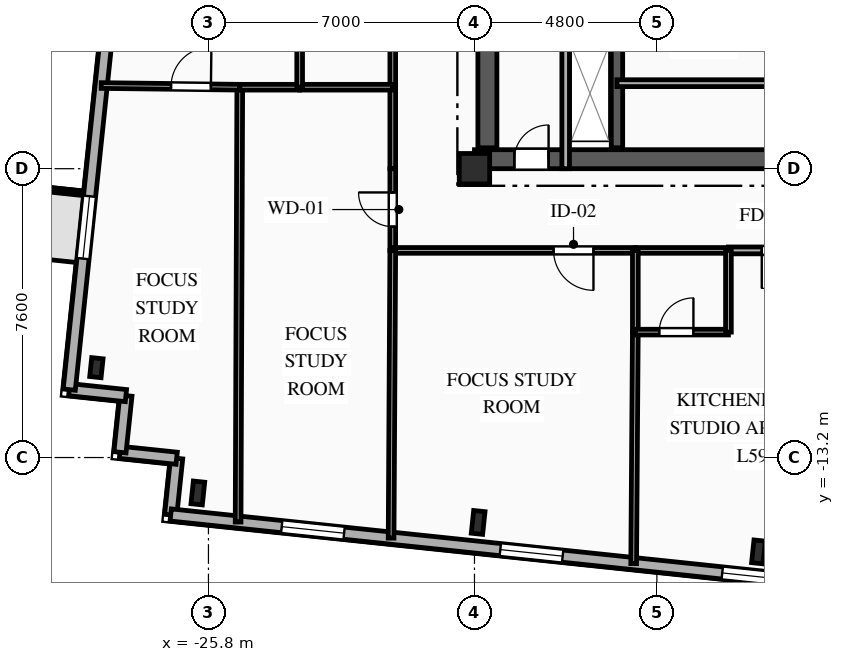
"""IFC4 building model, lengths in metres.
Left out: names, types, materials, properties, quantities, classifications, styles, units other than length and angle.
Written with IfcOpenShell. Run it as: python <this file> out.ifc"""

import sys

from ifc_helpers import new_model, si_unit, direction, frame, frame_2d, origin, origin_2d, place, context, subcontext, project, spatial, rectangle, i_section, extrude, element, fill, save


model = new_model("IFC4")
c1 = context("Model", 3, precision=1e-05, world=origin(), true_north=direction((0.0, 1.0)))
c2 = subcontext(c1, "Body", "Model", "MODEL_VIEW")
j1 = project(units=[si_unit("LENGTHUNIT", "METRE"), si_unit("PLANEANGLEUNIT", "RADIAN")], contexts=[c1])
p1 = place(None, origin())
s1 = spatial("IfcSite", under=j1, at=p1, CompositionType="ELEMENT")
p2 = place(p1, origin())
s2 = spatial("IfcBuilding", under=s1, at=p2, CompositionType="ELEMENT")
p3 = place(p2, frame((0.0, 0.0, 209.8)))
s3 = spatial("IfcBuildingStorey", under=s2, at=p3, CompositionType="ELEMENT", Elevation=209.8)
p4 = place(p3, frame((-18.8, -5.6, 0.0), z_axis=(0.0, 0.0, 1.0), x_axis=(1.0, 0.0, 0.0)))
e1 = element("IfcColumn", 1, at=p4, inside=s3, PredefinedType="COLUMN", context=c2, shape_type="SweptSolid", body=[
    extrude(rectangle(XDim=0.8, YDim=0.8, at=origin_2d()), origin(), (0.0, 0.0, 1.0), 3.35),
])
for number, where, z_axis, x_axis in (
    (2, (-26.079, -14.133, 0.0), (0.0, 0.0, 1.0), (0.995, -0.105, 0.0)),
    (3, (-18.703, -14.908, 0.0), (0.0, 0.0, 1.0), (0.995, -0.105, 0.0)),
    (4, (-11.327, -15.683, 0.0), (0.0, 0.0, 1.0), (0.995, -0.105, 0.0)),
):
    element("IfcColumn", number, at=place(p3, frame(where, z_axis=z_axis, x_axis=x_axis)), inside=s3, PredefinedType="COLUMN", context=c2, shape_type="SweptSolid", body=[
        extrude(i_section(OverallWidth=0.3, OverallDepth=0.6, WebThickness=0.015, FlangeThickness=0.03, FilletRadius=0.027, at=origin_2d()), origin(), (0.0, 0.0, 1.0), 3.35),
    ])
p5 = place(p3, frame((-28.749, -10.835, 0.0), z_axis=(0.0, 0.0, 1.0), x_axis=(0.994521895368, -0.104528463268, 0.0)))
e5 = element("IfcColumn", 5, at=p5, inside=s3, PredefinedType="COLUMN", context=c2, shape_type="SweptSolid", body=[
    extrude(i_section(OverallWidth=0.3, OverallDepth=0.5, WebThickness=0.014, FlangeThickness=0.028, FilletRadius=0.027, at=origin_2d()), origin(), (0.0, 0.0, 1.0), 3.35),
])
for number, where, z_axis, x_axis in (
    (6, (-26.793, -14.711, 0.0), (0.0, 0.0, 1.0), (0.104, 0.995, 0.0)),
    (7, (-26.637, -13.219, 0.0), (0.0, 0.0, 1.0), (-0.995, 0.104, 0.0)),
):
    element("IfcWall", number, at=place(p3, frame(where, z_axis=z_axis, x_axis=x_axis)), inside=s3, PredefinedType="SOLIDWALL", context=c2, shape_type="SweptSolid", body=[
        extrude(rectangle(XDim=1.5, YDim=0.32, at=frame_2d((0.75, 0.0))), origin(), (0.0, 0.0, 1.0), 3.04),
    ])
p6 = place(p3, frame((-28.128, -13.062, 0.0), z_axis=(0.0, 0.0, 1.0), x_axis=(0.104481464157, 0.994526834051, 0.0)))
e8 = element("IfcWall", 8, at=p6, inside=s3, PredefinedType="SOLIDWALL", context=c2, shape_type="SweptSolid", body=[
    extrude(rectangle(XDim=1.5, YDim=0.32, at=frame_2d((0.75, 0.0))), origin(), (0.0, 0.0, 1.0), 3.04),
])
p7 = place(p3, frame((-27.972, -11.571, 0.0), z_axis=(0.0, 0.0, 1.0), x_axis=(-0.994525057048, 0.104498377516, 0.0)))
e9 = element("IfcWall", 9, at=p7, inside=s3, PredefinedType="SOLIDWALL", context=c2, shape_type="SweptSolid", body=[
    extrude(rectangle(XDim=1.5, YDim=0.32, at=frame_2d((0.75, 0.0))), origin(), (0.0, 0.0, 1.0), 3.04),
])
p8 = place(p3, frame((-29.463, -11.414, 0.0), z_axis=(0.0, 0.0, 1.0), x_axis=(0.104530779244, 0.994521651947, 0.0)))
e10 = element("IfcWall", 10, at=p8, inside=s3, PredefinedType="SOLIDWALL", context=c2, shape_type="SweptSolid", body=[
    extrude(rectangle(XDim=28.8, YDim=0.32, at=frame_2d((14.4, 0.0))), origin(), (0.0, 0.0, 1.0), 3.04),
])
p9 = place(p8, frame((3.467, 0.0, 0.85)))
e11 = element("IfcOpeningElement", 11, at=p9, cuts=e10, PredefinedType="OPENING", context=c2, shape_type="SweptSolid", body=[
    extrude(rectangle(XDim=1.65, YDim=1.85, at=frame_2d((0.825, 0.925))), frame((0.0, 0.17, 0.0), z_axis=(0.0, -1.0, 0.0), x_axis=(1.0, 0.0, 0.0)), (0.0, 0.0, 1.0), 0.34),
])
p10 = place(p8, frame((12.738, 0.0, 0.85)))
e12 = element("IfcOpeningElement", 12, at=p10, cuts=e10, PredefinedType="OPENING", context=c2, shape_type="SweptSolid", body=[
    extrude(rectangle(XDim=2.2, YDim=1.85, at=frame_2d((1.1, 0.925))), frame((0.0, 0.17, 0.0), z_axis=(0.0, -1.0, 0.0), x_axis=(1.0, 0.0, 0.0)), (0.0, 0.0, 1.0), 0.34),
])
p11 = place(p8, frame((23.162, 0.0, 0.85)))
e13 = element("IfcOpeningElement", 13, at=p11, cuts=e10, PredefinedType="OPENING", context=c2, shape_type="SweptSolid", body=[
    extrude(rectangle(XDim=1.65, YDim=1.85, at=frame_2d((0.825, 0.925))), frame((0.0, 0.17, 0.0), z_axis=(0.0, -1.0, 0.0), x_axis=(1.0, 0.0, 0.0)), (0.0, 0.0, 1.0), 0.34),
])
p12 = place(p3, frame((18.756, -19.498, 0.0), z_axis=(0.0, 0.0, 1.0), x_axis=(-0.994522060044, 0.104526896475, 0.0)))
e14 = element("IfcWall", 14, at=p12, inside=s3, PredefinedType="SOLIDWALL", context=c2, shape_type="SweptSolid", body=[
    extrude(rectangle(XDim=45.8, YDim=0.32, at=frame_2d((22.9, 0.0))), origin(), (0.0, 0.0, 1.0), 3.04),
])
p13 = place(p12, frame((2.778, 0.0, 0.85)))
e15 = element("IfcOpeningElement", 15, at=p13, cuts=e14, PredefinedType="OPENING", context=c2, shape_type="SweptSolid", body=[
    extrude(rectangle(XDim=1.65, YDim=1.85, at=frame_2d((0.825, 0.925))), frame((0.0, 0.17, 0.0), z_axis=(0.0, -1.0, 0.0), x_axis=(1.0, 0.0, 0.0)), (0.0, 0.0, 1.0), 0.34),
])
p14 = place(p12, frame((7.948, 0.0, 0.85)))
e16 = element("IfcOpeningElement", 16, at=p14, cuts=e14, PredefinedType="OPENING", context=c2, shape_type="SweptSolid", body=[
    extrude(rectangle(XDim=2.2, YDim=1.85, at=frame_2d((1.1, 0.925))), frame((0.0, 0.17, 0.0), z_axis=(0.0, -1.0, 0.0), x_axis=(1.0, 0.0, 0.0)), (0.0, 0.0, 1.0), 0.34),
])
p15 = place(p12, frame((14.954, 0.0, 0.85)))
e17 = element("IfcOpeningElement", 17, at=p15, cuts=e14, PredefinedType="OPENING", context=c2, shape_type="SweptSolid", body=[
    extrude(rectangle(XDim=2.2, YDim=1.85, at=frame_2d((1.1, 0.925))), frame((0.0, 0.17, 0.0), z_axis=(0.0, -1.0, 0.0), x_axis=(1.0, 0.0, 0.0)), (0.0, 0.0, 1.0), 0.34),
])
p16 = place(p12, frame((21.96, 0.0, 0.85)))
e18 = element("IfcOpeningElement", 18, at=p16, cuts=e14, PredefinedType="OPENING", context=c2, shape_type="SweptSolid", body=[
    extrude(rectangle(XDim=2.2, YDim=1.85, at=frame_2d((1.1, 0.925))), frame((0.0, 0.17, 0.0), z_axis=(0.0, -1.0, 0.0), x_axis=(1.0, 0.0, 0.0)), (0.0, 0.0, 1.0), 0.34),
])
p17 = place(p12, frame((29.006, 0.0, 0.85)))
e19 = element("IfcOpeningElement", 19, at=p17, cuts=e14, PredefinedType="OPENING", context=c2, shape_type="SweptSolid", body=[
    extrude(rectangle(XDim=2.2, YDim=1.85, at=frame_2d((1.1, 0.925))), frame((0.0, 0.17, 0.0), z_axis=(0.0, -1.0, 0.0), x_axis=(1.0, 0.0, 0.0)), (0.0, 0.0, 1.0), 0.34),
])
p18 = place(p12, frame((35.429, 0.0, 0.85)))
e20 = element("IfcOpeningElement", 20, at=p18, cuts=e14, PredefinedType="OPENING", context=c2, shape_type="SweptSolid", body=[
    extrude(rectangle(XDim=1.65, YDim=1.85, at=frame_2d((0.825, 0.925))), frame((0.0, 0.17, 0.0), z_axis=(0.0, -1.0, 0.0), x_axis=(1.0, 0.0, 0.0)), (0.0, 0.0, 1.0), 0.34),
])
p19 = place(p12, frame((41.212, 0.0, 0.85)))
e21 = element("IfcOpeningElement", 21, at=p19, cuts=e14, PredefinedType="OPENING", context=c2, shape_type="SweptSolid", body=[
    extrude(rectangle(XDim=1.65, YDim=1.85, at=frame_2d((0.825, 0.925))), frame((0.0, 0.17, 0.0), z_axis=(0.0, -1.0, 0.0), x_axis=(1.0, 0.0, 0.0)), (0.0, 0.0, 1.0), 0.34),
])
p20 = place(p3, frame((-18.8, -5.35, 0.0), z_axis=(0.0, 0.0, 1.0), x_axis=(1.0, 0.0, 0.0)))
e22 = element("IfcWall", 22, at=p20, inside=s3, PredefinedType="SHEAR", context=c2, shape_type="SweptSolid", body=[
    extrude(rectangle(XDim=9.6, YDim=0.5, at=frame_2d((4.8, 0.0))), origin(), (0.0, 0.0, 1.0), 3.04),
])
p21 = place(p20, frame((1.05, 0.0, 0.0)))
e23 = element("IfcOpeningElement", 23, at=p21, cuts=e22, PredefinedType="OPENING", context=c2, shape_type="SweptSolid", body=[
    extrude(rectangle(XDim=0.9, YDim=2.1, at=frame_2d((0.45, 1.05))), frame((0.0, 0.26, 0.0), z_axis=(0.0, -1.0, 0.0), x_axis=(1.0, 0.0, 0.0)), (0.0, 0.0, 1.0), 0.52),
])
p22 = place(p3, frame((-18.46, -5.05, 0.0), z_axis=(0.0, 0.0, 1.0), x_axis=(0.0, 1.0, 0.0)))
e24 = element("IfcWall", 24, at=p22, inside=s3, PredefinedType="SHEAR", context=c2, shape_type="SweptSolid", body=[
    extrude(rectangle(XDim=10.1, YDim=0.5, at=frame_2d((5.05, 0.0))), origin(), (0.0, 0.0, 1.0), 3.04),
])
p23 = place(p3, frame((-15.05, -5.05, 0.0), z_axis=(0.0, 0.0, 1.0), x_axis=(0.0, 1.0, 0.0)))
e25 = element("IfcWall", 25, at=p23, inside=s3, PredefinedType="SHEAR", context=c2, shape_type="SweptSolid", body=[
    extrude(rectangle(XDim=10.1, YDim=0.3, at=frame_2d((5.05, 0.0))), origin(), (0.0, 0.0, 1.0), 3.04),
])
p24 = place(p3, frame((-16.4, -5.6, 0.0), z_axis=(0.0, 0.0, 1.0), x_axis=(0.0, 1.0, 0.0)))
e26 = element("IfcWall", 26, at=p24, inside=s3, PredefinedType="PARTITIONING", context=c2, shape_type="SweptSolid", body=[
    extrude(rectangle(XDim=3.49, YDim=0.2, at=frame_2d((1.745, 0.0))), origin(), (0.0, 0.0, 1.0), 3.04),
])
p25 = place(p3, frame((-15.05, -3.35, 0.0), z_axis=(0.0, 0.0, 1.0), x_axis=(1.0, 0.0, 0.0)))
e27 = element("IfcWall", 27, at=p25, inside=s3, PredefinedType="PARTITIONING", context=c2, shape_type="SweptSolid", body=[
    extrude(rectangle(XDim=5.85, YDim=0.18, at=frame_2d((2.925, 0.0))), origin(), (0.0, 0.0, 1.0), 2.755),
])
p26 = place(p3, frame((-20.95, -7.75, 0.0), z_axis=(0.0, 0.0, 1.0), x_axis=(0.0, 1.0, 0.0)))
e28 = element("IfcWall", 28, at=p26, inside=s3, PredefinedType="PARTITIONING", context=c2, shape_type="SweptSolid", body=[
    extrude(rectangle(XDim=2.15, YDim=0.15, at=frame_2d((1.075, 0.0))), origin(), (0.0, 0.0, 1.0), 3.04),
])
p27 = place(p26, frame((0.625, 0.0, 0.0)))
e29 = element("IfcOpeningElement", 29, at=p27, cuts=e28, PredefinedType="OPENING", context=c2, shape_type="SweptSolid", body=[
    extrude(rectangle(XDim=0.9, YDim=2.1, at=frame_2d((0.45, 1.05))), frame((0.0, 0.085, 0.0), z_axis=(0.0, -1.0, 0.0), x_axis=(1.0, 0.0, 0.0)), (0.0, 0.0, 1.0), 0.17),
])
p28 = place(p3, frame((-14.567, -7.75, 0.0), z_axis=(0.0, 0.0, 1.0), x_axis=(-1.0, 0.0, 0.0)))
e30 = element("IfcWall", 30, at=p28, inside=s3, PredefinedType="PARTITIONING", context=c2, shape_type="SweptSolid", body=[
    extrude(rectangle(XDim=6.383, YDim=0.15, at=frame_2d((3.191, 0.0))), origin(), (0.0, 0.0, 1.0), 3.04),
])
p29 = place(p28, frame((1.102, 0.0, 0.0)))
e31 = element("IfcOpeningElement", 31, at=p29, cuts=e30, PredefinedType="OPENING", context=c2, shape_type="SweptSolid", body=[
    extrude(rectangle(XDim=1.05, YDim=2.15, at=frame_2d((0.525, 1.075))), frame((0.0, 0.085, 0.0), z_axis=(0.0, -1.0, 0.0), x_axis=(1.0, 0.0, 0.0)), (0.0, 0.0, 1.0), 0.17),
])
p30 = place(p3, frame((-7.583, -7.75, 0.0), z_axis=(0.0, 0.0, 1.0), x_axis=(-1.0, 0.0, 0.0)))
e32 = element("IfcWall", 32, at=p30, inside=s3, PredefinedType="PARTITIONING", context=c2, shape_type="SweptSolid", body=[
    extrude(rectangle(XDim=4.534, YDim=0.18, at=frame_2d((2.267, 0.0))), origin(), (0.0, 0.0, 1.0), 3.04),
])
p31 = place(p30, frame((2.657, 0.0, 0.0)))
e33 = element("IfcOpeningElement", 33, at=p31, cuts=e32, PredefinedType="OPENING", context=c2, shape_type="SweptSolid", body=[
    extrude(rectangle(XDim=1.0, YDim=2.15, at=frame_2d((0.5, 1.075))), frame((0.0, 0.1, 0.0), z_axis=(0.0, -1.0, 0.0), x_axis=(1.0, 0.0, 0.0)), (0.0, 0.0, 1.0), 0.2),
])
p32 = place(p3, frame((-12.117, -7.75, 0.0), z_axis=(0.0, 0.0, 1.0), x_axis=(-1.0, 0.0, 0.0)))
e34 = element("IfcWall", 34, at=p32, inside=s3, PredefinedType="PLUMBINGWALL", context=c2, shape_type="SweptSolid", body=[
    extrude(rectangle(XDim=2.45, YDim=0.15, at=frame_2d((1.225, 0.0))), origin(), (0.0, 0.0, 1.0), 3.04),
])
p33 = place(p3, frame((-20.95, -5.6, 0.0), z_axis=(0.0, 0.0, 1.0), x_axis=(0.0, 1.0, 0.0)))
e35 = element("IfcWall", 35, at=p33, inside=s3, PredefinedType="PARTITIONING", context=c2, shape_type="SweptSolid", body=[
    extrude(rectangle(XDim=2.144, YDim=0.15, at=frame_2d((1.072, 0.0))), origin(), (0.0, 0.0, 1.0), 3.04),
])
p34 = place(p3, frame((-20.95, -3.456, 0.0), z_axis=(0.0, 0.0, 1.0), x_axis=(0.0, 1.0, 0.0)))
e36 = element("IfcWall", 36, at=p34, inside=s3, PredefinedType="PLUMBINGWALL", context=c2, shape_type="SweptSolid", body=[
    extrude(rectangle(XDim=2.15, YDim=0.15, at=frame_2d((1.075, 0.0))), origin(), (0.0, 0.0, 1.0), 3.04),
])
p35 = place(p3, frame((-24.976, -3.456, 0.0), z_axis=(0.0, 0.0, 1.0), x_axis=(-0.003840873, -0.99999262382, 0.0)))
e37 = element("IfcWall", 37, at=p35, inside=s3, PredefinedType="PARTITIONING", context=c2, shape_type="SweptSolid", body=[
    extrude(rectangle(XDim=11.441, YDim=0.15, at=frame_2d((5.721, 0.0))), origin(), (0.0, 0.0, 1.0), 3.04),
])
p36 = place(p3, frame((-28.622, -3.412, 0.0), z_axis=(0.0, 0.0, 1.0), x_axis=(0.999927389555, -0.01205054433, 0.0)))
e38 = element("IfcWall", 38, at=p36, inside=s3, PredefinedType="PARTITIONING", context=c2, shape_type="SweptSolid", body=[
    extrude(rectangle(XDim=3.647, YDim=0.15, at=frame_2d((1.823, 0.0))), origin(), (0.0, 0.0, 1.0), 3.04),
])
p37 = place(p36, frame((1.837, 0.0, 0.0)))
e39 = element("IfcOpeningElement", 39, at=p37, cuts=e38, PredefinedType="OPENING", context=c2, shape_type="SweptSolid", body=[
    extrude(rectangle(XDim=1.05, YDim=2.15, at=frame_2d((0.525, 1.075))), frame((0.0, 0.085, 0.0), z_axis=(0.0, -1.0, 0.0), x_axis=(1.0, 0.0, 0.0)), (0.0, 0.0, 1.0), 0.17),
])
p38 = place(p3, frame((-24.976, -3.456, 0.0), z_axis=(0.0, 0.0, 1.0), x_axis=(1.0, 0.0, 0.0)))
e40 = element("IfcWall", 40, at=p38, inside=s3, PredefinedType="PARTITIONING", context=c2, shape_type="SweptSolid", body=[
    extrude(rectangle(XDim=1.576, YDim=0.15, at=frame_2d((0.788, 0.0))), origin(), (0.0, 0.0, 1.0), 3.04),
])
p39 = place(p3, frame((-23.4, -3.456, 0.0), z_axis=(0.0, 0.0, 1.0), x_axis=(1.0, 0.0, 0.0)))
e41 = element("IfcWall", 41, at=p39, inside=s3, PredefinedType="PLUMBINGWALL", context=c2, shape_type="SweptSolid", body=[
    extrude(rectangle(XDim=2.45, YDim=0.15, at=frame_2d((1.225, 0.0))), origin(), (0.0, 0.0, 1.0), 3.04),
])
p40 = place(p3, frame((-20.95, -7.75, 0.0), z_axis=(0.0, 0.0, 1.0), x_axis=(-0.005804668564, -0.99998315277, 0.0)))
e42 = element("IfcWall", 42, at=p40, inside=s3, PredefinedType="PARTITIONING", context=c2, shape_type="SweptSolid", body=[
    extrude(rectangle(XDim=7.571, YDim=0.15, at=frame_2d((3.785, 0.0))), origin(), (0.0, 0.0, 1.0), 3.04),
])
p41 = place(p3, frame((-23.4, -1.306, 0.0), z_axis=(0.0, 0.0, 1.0), x_axis=(0.0, -1.0, 0.0)))
e43 = element("IfcWall", 43, at=p41, inside=s3, PredefinedType="PLUMBINGWALL", context=c2, shape_type="SweptSolid", body=[
    extrude(rectangle(XDim=2.15, YDim=0.15, at=frame_2d((1.075, 0.0))), origin(), (0.0, 0.0, 1.0), 2.695),
])
p42 = place(p3, frame((-14.567, -9.9, 0.0), z_axis=(0.0, 0.0, 1.0), x_axis=(-0.007213951996, -0.99997397911, 0.0)))
e44 = element("IfcWall", 44, at=p42, inside=s3, PredefinedType="PARTITIONING", context=c2, shape_type="SweptSolid", body=[
    extrude(rectangle(XDim=6.092, YDim=0.15, at=frame_2d((3.046, 0.0))), origin(), (0.0, 0.0, 1.0), 3.04),
])
p43 = place(p3, frame((-14.567, -7.75, 0.0), z_axis=(0.0, 0.0, 1.0), x_axis=(0.0, -1.0, 0.0)))
e45 = element("IfcWall", 45, at=p43, inside=s3, PredefinedType="PLUMBINGWALL", context=c2, shape_type="SweptSolid", body=[
    extrude(rectangle(XDim=2.15, YDim=0.15, at=frame_2d((1.075, 0.0))), origin(), (0.0, 0.0, 1.0), 3.04),
])
p44 = place(p3, frame((-14.567, -9.9, 0.0), z_axis=(0.0, 0.0, 1.0), x_axis=(1.0, 0.0, 0.0)))
e46 = element("IfcWall", 46, at=p44, inside=s3, PredefinedType="PLUMBINGWALL", context=c2, shape_type="SweptSolid", body=[
    extrude(rectangle(XDim=2.45, YDim=0.15, at=frame_2d((1.225, 0.0))), origin(), (0.0, 0.0, 1.0), 3.04),
])
p45 = place(p44, frame((0.629, 0.0, 0.0)))
e47 = element("IfcOpeningElement", 47, at=p45, cuts=e46, PredefinedType="OPENING", context=c2, shape_type="SweptSolid", body=[
    extrude(rectangle(XDim=0.9, YDim=2.1, at=frame_2d((0.45, 1.05))), frame((0.0, 0.085, 0.0), z_axis=(0.0, -1.0, 0.0), x_axis=(1.0, 0.0, 0.0)), (0.0, 0.0, 1.0), 0.17),
])
p46 = place(p3, frame((-12.117, -9.9, 0.0), z_axis=(0.0, 0.0, 1.0), x_axis=(0.0, 1.0, 0.0)))
e48 = element("IfcWall", 48, at=p46, inside=s3, PredefinedType="PLUMBINGWALL", context=c2, shape_type="SweptSolid", body=[
    extrude(rectangle(XDim=2.15, YDim=0.15, at=frame_2d((1.075, 0.0))), origin(), (0.0, 0.0, 1.0), 3.04),
])
p47 = place(p9, origin())
e49 = element("IfcWindow", 49, at=p47, inside=s3, PartitioningType="SINGLE_PANEL", PredefinedType="WINDOW", context=c2, shape_type="SweptSolid", body=[
    extrude(rectangle(XDim=1.65, YDim=1.85, at=frame_2d((0.825, 0.925))), frame((0.0, 0.03, 0.0), z_axis=(0.0, -1.0, 0.0), x_axis=(1.0, 0.0, 0.0)), (0.0, 0.0, 1.0), 0.06),
])
fill(e11, e49)
p48 = place(p17, origin())
e50 = element("IfcWindow", 50, at=p48, inside=s3, PartitioningType="SINGLE_PANEL", PredefinedType="WINDOW", context=c2, shape_type="SweptSolid", body=[
    extrude(rectangle(XDim=2.2, YDim=1.85, at=frame_2d((1.1, 0.925))), frame((0.0, 0.03, 0.0), z_axis=(0.0, -1.0, 0.0), x_axis=(1.0, 0.0, 0.0)), (0.0, 0.0, 1.0), 0.06),
])
fill(e19, e50)
p49 = place(p18, origin())
e51 = element("IfcWindow", 51, at=p49, inside=s3, PartitioningType="SINGLE_PANEL", PredefinedType="WINDOW", context=c2, shape_type="SweptSolid", body=[
    extrude(rectangle(XDim=1.65, YDim=1.85, at=frame_2d((0.825, 0.925))), frame((0.0, 0.03, 0.0), z_axis=(0.0, -1.0, 0.0), x_axis=(1.0, 0.0, 0.0)), (0.0, 0.0, 1.0), 0.06),
])
fill(e20, e51)
p50 = place(p19, origin())
e52 = element("IfcWindow", 52, at=p50, inside=s3, PartitioningType="SINGLE_PANEL", PredefinedType="WINDOW", context=c2, shape_type="SweptSolid", body=[
    extrude(rectangle(XDim=1.65, YDim=1.85, at=frame_2d((0.825, 0.925))), frame((0.0, 0.03, 0.0), z_axis=(0.0, -1.0, 0.0), x_axis=(1.0, 0.0, 0.0)), (0.0, 0.0, 1.0), 0.06),
])
fill(e21, e52)
p51 = place(p21, origin())
e53 = element("IfcDoor", 53, at=p51, inside=s3, OperationType="SINGLE_SWING_RIGHT", PredefinedType="DOOR", context=c2, shape_type="SweptSolid", body=[
    extrude(rectangle(XDim=0.9, YDim=2.1, at=frame_2d((0.45, 1.05))), frame((0.0, 0.025, 0.0), z_axis=(0.0, -1.0, 0.0), x_axis=(1.0, 0.0, 0.0)), (0.0, 0.0, 1.0), 0.05),
])
fill(e23, e53)
p52 = place(p27, origin())
e54 = element("IfcDoor", 54, at=p52, inside=s3, OperationType="SINGLE_SWING_RIGHT", PredefinedType="DOOR", context=c2, shape_type="SweptSolid", body=[
    extrude(rectangle(XDim=0.9, YDim=2.1, at=frame_2d((0.45, 1.05))), frame((0.0, 0.025, 0.0), z_axis=(0.0, -1.0, 0.0), x_axis=(1.0, 0.0, 0.0)), (0.0, 0.0, 1.0), 0.05),
])
fill(e29, e54)
p53 = place(p29, origin())
e55 = element("IfcDoor", 55, at=p53, inside=s3, OperationType="SINGLE_SWING_LEFT", PredefinedType="DOOR", context=c2, shape_type="SweptSolid", body=[
    extrude(rectangle(XDim=1.05, YDim=2.15, at=frame_2d((0.525, 1.075))), frame((0.0, 0.025, 0.0), z_axis=(0.0, -1.0, 0.0), x_axis=(1.0, 0.0, 0.0)), (0.0, 0.0, 1.0), 0.05),
])
fill(e31, e55)
p54 = place(p31, origin())
e56 = element("IfcDoor", 56, at=p54, inside=s3, OperationType="SINGLE_SWING_RIGHT", PredefinedType="DOOR", context=c2, shape_type="SweptSolid", body=[
    extrude(rectangle(XDim=1.0, YDim=2.15, at=frame_2d((0.5, 1.075))), frame((0.0, 0.025, 0.0), z_axis=(0.0, -1.0, 0.0), x_axis=(1.0, 0.0, 0.0)), (0.0, 0.0, 1.0), 0.05),
])
fill(e33, e56)
p55 = place(p37, origin())
e57 = element("IfcDoor", 57, at=p55, inside=s3, OperationType="SINGLE_SWING_RIGHT", PredefinedType="DOOR", context=c2, shape_type="SweptSolid", body=[
    extrude(rectangle(XDim=1.05, YDim=2.15, at=frame_2d((0.525, 1.075))), frame((0.0, 0.025, 0.0), z_axis=(0.0, -1.0, 0.0), x_axis=(1.0, 0.0, 0.0)), (0.0, 0.0, 1.0), 0.05),
])
fill(e39, e57)
p56 = place(p45, origin())
e58 = element("IfcDoor", 58, at=p56, inside=s3, OperationType="SINGLE_SWING_RIGHT", PredefinedType="DOOR", context=c2, shape_type="SweptSolid", body=[
    extrude(rectangle(XDim=0.9, YDim=2.1, at=frame_2d((0.45, 1.05))), frame((0.0, 0.025, 0.0), z_axis=(0.0, -1.0, 0.0), x_axis=(1.0, 0.0, 0.0)), (0.0, 0.0, 1.0), 0.05),
])
fill(e47, e58)
save(model, sys.argv[1])
